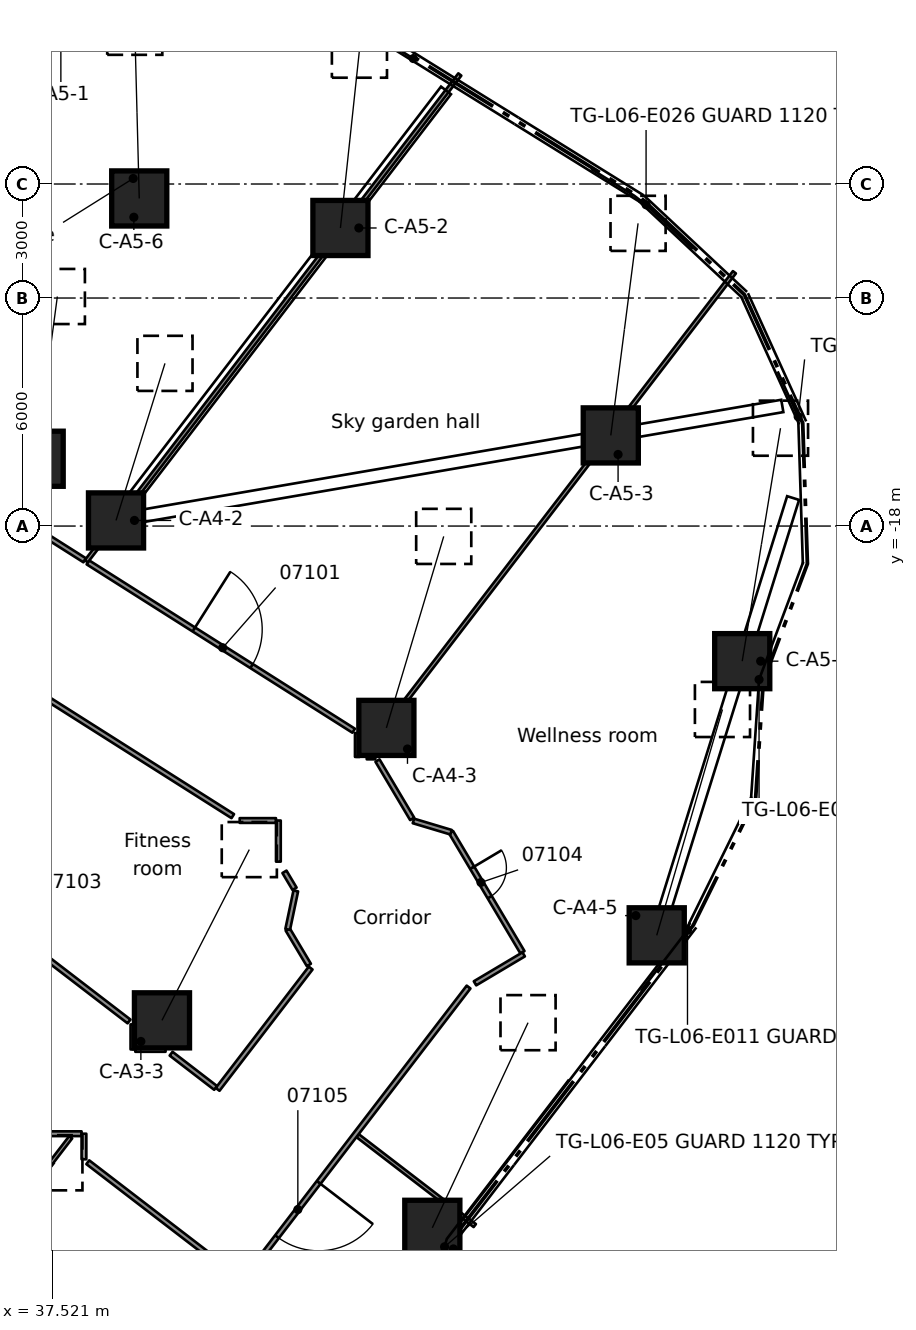
"""IFC4 building model, lengths in metres.
Left out: names, types, materials, properties, quantities, classifications, styles, units other than length and angle.
Written with IfcOpenShell. Run it as: python <this file> out.ifc"""

import sys

from ifc_helpers import new_model, si_unit, direction, frame, frame_2d, origin, origin_2d, place, context, subcontext, project, spatial, rectangle, extrude, element, fill, save


model = new_model("IFC4")
c1 = context("Model", 3, precision=1e-05, world=origin(), true_north=direction((0.0, 1.0)))
c2 = subcontext(c1, "Body", "Model", "MODEL_VIEW")
j1 = project(units=[si_unit("LENGTHUNIT", "METRE"), si_unit("PLANEANGLEUNIT", "RADIAN")], contexts=[c1])
p1 = place(None, origin())
s1 = spatial("IfcSite", under=j1, at=p1, CompositionType="ELEMENT")
p2 = place(p1, origin())
s2 = spatial("IfcBuilding", under=s1, at=p2, CompositionType="ELEMENT")
p3 = place(p2, frame((0.0, 0.0, 33.3)))
s3 = spatial("IfcBuildingStorey", under=s2, at=p3, CompositionType="ELEMENT", Elevation=33.3)
p4 = place(p3, frame((34.503, -38.702, 0.637), z_axis=(0.541117976568, 0.69200623164, 0.477827072073), x_axis=(-0.78775473141, 0.615989028426, 0.0)))
e1 = element("IfcColumn", 1, at=p4, inside=s3, PredefinedType="COLUMN", context=c2, shape_type="SweptSolid", body=[
    extrude(rectangle(XDim=1.45, YDim=1.45, at=origin_2d()), origin(), (0.0, 0.0, 1.0), 5.705),
])
p5 = place(p3, frame((40.408, -31.006, 0.638), z_axis=(0.400711857271, 0.78345915449, 0.474996590187), x_axis=(-0.890307002668, 0.455360781141, 0.0)))
e2 = element("IfcColumn", 2, at=p5, inside=s3, PredefinedType="COLUMN", context=c2, shape_type="SweptSolid", body=[
    extrude(rectangle(XDim=1.45, YDim=1.45, at=origin_2d()), origin(), (0.0, 0.0, 1.0), 5.735),
])
p6 = place(p3, frame((47.522, -36.465, 0.661), z_axis=(0.385700751852, 0.82653899246, 0.409961246905), x_axis=(-0.90619046906, 0.422869759837, 0.0)))
e3 = element("IfcColumn", 3, at=p6, inside=s3, PredefinedType="COLUMN", context=c2, shape_type="SweptSolid", body=[
    extrude(rectangle(XDim=1.45, YDim=1.45, at=origin_2d()), origin(), (0.0, 0.0, 1.0), 6.531),
])
p7 = place(p3, frame((39.199, -17.852, 0.61), z_axis=(0.25036864759, 0.80335307715, 0.540314143566), x_axis=(-0.954709488998, 0.297539563114, 0.0)))
e4 = element("IfcColumn", 4, at=p7, inside=s3, PredefinedType="COLUMN", context=c2, shape_type="SweptSolid", body=[
    extrude(rectangle(XDim=1.45, YDim=1.45, at=origin_2d()), origin(), (0.0, 0.0, 1.0), 5.145),
])
p8 = place(p3, frame((46.313, -23.311, 0.644), z_axis=(0.255000909498, 0.851515737267, 0.458143520463), x_axis=(-0.957966687466, 0.286879461978, 0.0)))
e5 = element("IfcColumn", 5, at=p8, inside=s3, PredefinedType="COLUMN", context=c2, shape_type="SweptSolid", body=[
    extrude(rectangle(XDim=1.45, YDim=1.45, at=origin_2d()), origin(), (0.0, 0.0, 1.0), 5.918),
])
p9 = place(p3, frame((53.427, -28.769, 0.666), z_axis=(0.256655259317, 0.881704625679, 0.39588512339), x_axis=(-0.960148736075, 0.279489542942, 0.0)))
e6 = element("IfcColumn", 6, at=p9, inside=s3, PredefinedType="COLUMN", context=c2, shape_type="SweptSolid", body=[
    extrude(rectangle(XDim=1.45, YDim=1.45, at=origin_2d()), origin(), (0.0, 0.0, 1.0), 6.74),
])
p10 = place(p3, frame((37.084, -16.229, 0.609), z_axis=(0.111371211993, 0.832593849041, 0.54257159498), x_axis=(-0.991171870731, 0.132583266936, 0.0)))
e7 = element("IfcColumn", 7, at=p10, inside=s3, PredefinedType="COLUMN", context=c2, shape_type="SweptSolid", body=[
    extrude(rectangle(XDim=1.45, YDim=1.45, at=origin_2d()), origin(), (0.0, 0.0, 1.0), 5.127),
])
p11 = place(p3, frame((45.104, -10.157, 0.626), z_axis=(0.091757731711, 0.858660609492, 0.50426429219), x_axis=(-0.994338753554, 0.106256497119, 0.0)))
e8 = element("IfcColumn", 8, at=p11, inside=s3, PredefinedType="COLUMN", context=c2, shape_type="SweptSolid", body=[
    extrude(rectangle(XDim=1.45, YDim=1.45, at=origin_2d()), origin(), (0.0, 0.0, 1.0), 5.449),
])
p12 = place(p3, frame((52.218, -15.615, 0.654), z_axis=(0.115123823075, 0.894685515202, 0.431606689299), x_axis=(-0.99182275443, 0.127622975183, 0.0)))
e9 = element("IfcColumn", 9, at=p12, inside=s3, PredefinedType="COLUMN", context=c2, shape_type="SweptSolid", body=[
    extrude(rectangle(XDim=1.45, YDim=1.45, at=origin_2d()), origin(), (0.0, 0.0, 1.0), 6.237),
])
p13 = place(p3, frame((55.677, -21.555, 0.666), z_axis=(0.148964077478, 0.906712741166, 0.394565214672), x_axis=(-0.986771549623, 0.162116960419, 0.0)))
e10 = element("IfcColumn", 10, at=p13, inside=s3, PredefinedType="COLUMN", context=c2, shape_type="SweptSolid", body=[
    extrude(rectangle(XDim=1.45, YDim=1.45, at=origin_2d()), origin(), (0.0, 0.0, 1.0), 6.76),
])
p14 = place(p3, frame((39.81, -9.38, 0.618), z_axis=(-0.022355527015, 0.852096616474, 0.522906862267), x_axis=(-0.999656016178, -0.026226881604, 0.0)))
e11 = element("IfcColumn", 11, at=p14, inside=s3, PredefinedType="COLUMN", context=c2, shape_type="SweptSolid", body=[
    extrude(rectangle(XDim=1.45, YDim=1.45, at=origin_2d()), origin(), (0.0, 0.0, 1.0), 5.286),
])
p15 = place(p3, frame((43.631, -27.098, 0.0), z_axis=(0.0, 0.0, 1.0), x_axis=(0.511178490391, -0.859474578426, 0.0)))
e12 = element("IfcWall", 12, at=p15, inside=s3, PredefinedType="PARTITIONING", context=c2, shape_type="SweptSolid", body=[
    extrude(rectangle(XDim=0.52, YDim=0.125, at=frame_2d((0.26, 0.0))), origin(), (0.0, 0.0, 1.0), 3.56),
])
p16 = place(p3, frame((46.079, -24.17, 0.0), z_axis=(0.0, 0.0, 1.0), x_axis=(0.511094498765, -0.859524527476, 0.0)))
e13 = element("IfcWall", 13, at=p16, inside=s3, PredefinedType="PARTITIONING", context=c2, shape_type="SweptSolid", body=[
    extrude(rectangle(XDim=1.786, YDim=0.125, at=frame_2d((0.893, 0.0))), origin(), (0.0, 0.0, 1.0), 3.56),
])
p17 = place(p3, frame((48.015, -26.056, 0.0), z_axis=(0.0, 0.0, 1.0), x_axis=(0.511219942642, -0.859449923059, 0.0)))
e14 = element("IfcWall", 14, at=p17, inside=s3, PredefinedType="PARTITIONING", context=c2, shape_type="SweptSolid", body=[
    extrude(rectangle(XDim=3.676, YDim=0.125, at=frame_2d((1.838, 0.0))), origin(), (0.0, 0.0, 1.0), 3.56),
])
p18 = place(p17, frame((1.088, 0.0, 0.0)))
e15 = element("IfcOpeningElement", 15, at=p18, cuts=e14, PredefinedType="OPENING", context=c2, shape_type="SweptSolid", body=[
    extrude(rectangle(XDim=0.9, YDim=2.1, at=frame_2d((0.45, 1.05))), frame((0.0, 0.073, 0.0), z_axis=(0.0, -1.0, 0.0), x_axis=(1.0, 0.0, 0.0)), (0.0, 0.0, 1.0), 0.145),
])
p19 = place(p3, frame((43.716, -28.613, 0.0), z_axis=(0.0, 0.0, 1.0), x_axis=(0.511956455833, -0.859011401165, 0.0)))
e16 = element("IfcWall", 16, at=p19, inside=s3, PredefinedType="PARTITIONING", context=c2, shape_type="SweptSolid", body=[
    extrude(rectangle(XDim=1.09, YDim=0.125, at=frame_2d((0.545, 0.0))), origin(), (0.0, 0.0, 1.0), 3.56),
])
p20 = place(p3, frame((38.456, -34.739, 0.0), z_axis=(0.0, 0.0, 1.0), x_axis=(0.79321861851, -0.608936961638, 0.0)))
e17 = element("IfcWall", 17, at=p20, inside=s3, PredefinedType="PARTITIONING", context=c2, shape_type="SweptSolid", body=[
    extrude(rectangle(XDim=5.079, YDim=0.125, at=frame_2d((2.54, 0.0))), origin(), (0.0, 0.0, 1.0), 3.56),
])
p21 = place(p3, frame((33.534, -26.426, 0.0), z_axis=(0.0, 0.0, 1.0), x_axis=(0.793385739593, -0.60871920309, 0.0)))
e18 = element("IfcWall", 18, at=p21, inside=s3, PredefinedType="PARTITIONING", context=c2, shape_type="SweptSolid", body=[
    extrude(rectangle(XDim=7.572, YDim=0.125, at=frame_2d((3.786, 0.0))), origin(), (0.0, 0.0, 1.0), 3.56),
])
p22 = place(p21, frame((3.166, 0.0, 0.0)))
e19 = element("IfcOpeningElement", 19, at=p22, cuts=e18, PredefinedType="OPENING", context=c2, shape_type="SweptSolid", body=[
    extrude(rectangle(XDim=1.1, YDim=2.1, at=frame_2d((0.55, 1.05))), frame((0.0, 0.073, 0.0), z_axis=(0.0, -1.0, 0.0), x_axis=(1.0, 0.0, 0.0)), (0.0, 0.0, 1.0), 0.145),
])
p23 = place(p3, frame((40.648, -31.883, 0.0), z_axis=(0.0, 0.0, 1.0), x_axis=(0.792869496174, -0.609391468628, 0.0)))
e20 = element("IfcWall", 20, at=p23, inside=s3, PredefinedType="PARTITIONING", context=c2, shape_type="SweptSolid", body=[
    extrude(rectangle(XDim=1.478, YDim=0.125, at=frame_2d((0.739, 0.0))), origin(), (0.0, 0.0, 1.0), 3.56),
])
p24 = place(p3, frame((45.555, -34.039, 0.0), z_axis=(0.0, 0.0, 1.0), x_axis=(0.793288869705, -0.608845439502, 0.0)))
e21 = element("IfcWall", 21, at=p24, inside=s3, PredefinedType="PARTITIONING", context=c2, shape_type="SweptSolid", body=[
    extrude(rectangle(XDim=3.888, YDim=0.1, at=frame_2d((1.944, 0.0))), origin(), (0.0, 0.0, 1.0), 3.56),
])
p25 = place(p3, frame((36.312, -21.857, 0.0), z_axis=(0.0, 0.0, 1.0), x_axis=(0.844684518411, -0.535264480755, 0.0)))
e22 = element("IfcWall", 22, at=p25, inside=s3, PredefinedType="PARTITIONING", context=c2, shape_type="SweptSolid", body=[
    extrude(rectangle(XDim=7.055, YDim=0.125, at=frame_2d((3.527, 0.0))), origin(), (0.0, 0.0, 1.0), 3.56),
])
p26 = place(p3, frame((38.458, -18.955, 0.0), z_axis=(0.0, 0.0, 1.0), x_axis=(0.84479374754, -0.535092070692, 0.0)))
e23 = element("IfcWall", 23, at=p26, inside=s3, PredefinedType="PARTITIONING", context=c2, shape_type="SweptSolid", body=[
    extrude(rectangle(XDim=8.279, YDim=0.125, at=frame_2d((4.139, 0.0))), origin(), (0.0, 0.0, 1.0), 3.56),
])
p27 = place(p26, frame((3.3, 0.0, 0.0)))
e24 = element("IfcOpeningElement", 24, at=p27, cuts=e23, PredefinedType="OPENING", context=c2, shape_type="SweptSolid", body=[
    extrude(rectangle(XDim=1.8, YDim=2.1, at=frame_2d((0.9, 1.05))), frame((0.0, 0.073, 0.0), z_axis=(0.0, -1.0, 0.0), x_axis=(1.0, 0.0, 0.0)), (0.0, 0.0, 1.0), 0.145),
])
p28 = place(p3, frame((29.716, -13.418, 0.0), z_axis=(0.0, 0.0, 1.0), x_axis=(0.844839535243, -0.535019775047, 0.0)))
e25 = element("IfcWall", 25, at=p28, inside=s3, PredefinedType="PARTITIONING", context=c2, shape_type="SweptSolid", body=[
    extrude(rectangle(XDim=10.248, YDim=0.125, at=frame_2d((5.124, 0.0))), origin(), (0.0, 0.0, 1.0), 3.56),
])
p29 = place(p28, frame((4.3, 0.0, 0.0)))
e26 = element("IfcOpeningElement", 26, at=p29, cuts=e25, PredefinedType="OPENING", context=c2, shape_type="SweptSolid", body=[
    extrude(rectangle(XDim=1.8, YDim=2.1, at=frame_2d((0.9, 1.05))), frame((0.0, 0.073, 0.0), z_axis=(0.0, -1.0, 0.0), x_axis=(1.0, 0.0, 0.0)), (0.0, 0.0, 1.0), 0.145),
])
p30 = place(p3, frame((37.478, -33.989, 0.0), z_axis=(0.0, 0.0, 1.0), x_axis=(1.0, 0.0, 0.0)))
e27 = element("IfcWall", 27, at=p30, inside=s3, PredefinedType="PARTITIONING", context=c2, shape_type="SweptSolid", body=[
    extrude(rectangle(XDim=0.814, YDim=0.125, at=frame_2d((0.407, 0.0))), origin(), (0.0, 0.0, 1.0), 3.56),
])
p31 = place(p3, frame((39.706, -31.771, 0.0), z_axis=(0.0, 0.0, 1.0), x_axis=(1.0, 0.0, 0.0)))
e28 = element("IfcWall", 28, at=p31, inside=s3, PredefinedType="PARTITIONING", context=c2, shape_type="SweptSolid", body=[
    extrude(rectangle(XDim=0.796, YDim=0.125, at=frame_2d((0.398, 0.0))), origin(), (0.0, 0.0, 1.0), 3.56),
])
p32 = place(p3, frame((42.453, -25.748, 0.0), z_axis=(0.0, 0.0, 1.0), x_axis=(1.0, 0.0, 0.0)))
e29 = element("IfcWall", 29, at=p32, inside=s3, PredefinedType="PARTITIONING", context=c2, shape_type="SweptSolid", body=[
    extrude(rectangle(XDim=0.955, YDim=0.125, at=frame_2d((0.478, 0.0))), origin(), (0.0, 0.0, 1.0), 3.56),
])
p33 = place(p3, frame((45.796, -24.075, 0.0), z_axis=(0.0, 0.0, 1.0), x_axis=(1.0, 0.0, 0.0)))
e30 = element("IfcWall", 30, at=p33, inside=s3, PredefinedType="PARTITIONING", context=c2, shape_type="SweptSolid", body=[
    extrude(rectangle(XDim=0.226, YDim=0.125, at=frame_2d((0.113, 0.0))), origin(), (0.0, 0.0, 1.0), 3.56),
])
p34 = place(p3, frame((48.645, -30.032, 0.0), z_axis=(0.0, 0.0, 1.0), x_axis=(0.859452253387, 0.511216024933, 0.0)))
e31 = element("IfcWall", 31, at=p34, inside=s3, PredefinedType="PARTITIONING", context=c2, shape_type="SweptSolid", body=[
    extrude(rectangle(XDim=1.49, YDim=0.125, at=frame_2d((0.745, 0.0))), origin(), (0.0, 0.0, 1.0), 3.56),
])
p35 = place(p3, frame((47.024, -25.759, 0.0), z_axis=(0.0, 0.0, 1.0), x_axis=(0.957936637973, -0.286979786099, 0.0)))
e32 = element("IfcWall", 32, at=p35, inside=s3, PredefinedType="PARTITIONING", context=c2, shape_type="SweptSolid", body=[
    extrude(rectangle(XDim=1.034, YDim=0.125, at=frame_2d((0.517, 0.0))), origin(), (0.0, 0.0, 1.0), 3.56),
])
p36 = place(p3, frame((43.716, -28.613, 0.0), z_axis=(0.0, 0.0, 1.0), x_axis=(0.205677625046, 0.978619800819, 0.0)))
e33 = element("IfcWall", 33, at=p36, inside=s3, PredefinedType="PARTITIONING", context=c2, shape_type="SweptSolid", body=[
    extrude(rectangle(XDim=1.035, YDim=0.125, at=frame_2d((0.518, 0.0))), origin(), (0.0, 0.0, 1.0), 3.56),
])
p37 = place(p3, frame((48.476, -30.13, 0.0), z_axis=(0.0, 0.0, 1.0), x_axis=(-0.608819151361, -0.793309045036, 0.0)))
e34 = element("IfcWall", 34, at=p37, inside=s3, PredefinedType="PARTITIONING", context=c2, shape_type="SweptSolid", body=[
    extrude(rectangle(XDim=9.757, YDim=0.125, at=frame_2d((4.878, 0.0))), origin(), (0.0, 0.0, 1.0), 3.56),
])
p38 = place(p37, frame((6.479, 0.0, 0.0)))
e35 = element("IfcOpeningElement", 35, at=p38, cuts=e34, PredefinedType="OPENING", context=c2, shape_type="SweptSolid", body=[
    extrude(rectangle(XDim=1.8, YDim=2.1, at=frame_2d((0.9, 1.05))), frame((0.0, 0.073, 0.0), z_axis=(0.0, -1.0, 0.0), x_axis=(1.0, 0.0, 0.0)), (0.0, 0.0, 1.0), 0.145),
])
p39 = place(p3, frame((41.872, -32.822, 0.0), z_axis=(0.0, 0.0, 1.0), x_axis=(0.60869266474, 0.793406100236, 0.0)))
e36 = element("IfcWall", 36, at=p39, inside=s3, PredefinedType="PARTITIONING", context=c2, shape_type="SweptSolid", body=[
    extrude(rectangle(XDim=4.023, YDim=0.125, at=frame_2d((2.012, 0.0))), origin(), (0.0, 0.0, 1.0), 3.56),
])
p40 = place(p3, frame((28.054, -47.051, 0.0), z_axis=(0.0, 0.0, 1.0), x_axis=(0.608787965218, 0.793332977636, 0.0)))
e37 = element("IfcWall", 37, at=p40, inside=s3, PredefinedType="PARTITIONING", context=c2, shape_type="SweptSolid", body=[
    extrude(rectangle(XDim=16.347, YDim=0.1, at=frame_2d((8.174, 0.0))), origin(), (0.0, 0.0, 1.0), 3.56),
])
p41 = place(p3, frame((45.787, -23.942, 0.0), z_axis=(0.0, 0.0, 1.0), x_axis=(0.608772061456, 0.793345181614, 0.0)))
e38 = element("IfcWall", 38, at=p41, inside=s3, PredefinedType="PARTITIONING", context=c2, shape_type="SweptSolid", body=[
    extrude(rectangle(XDim=15.907, YDim=0.1, at=frame_2d((7.954, 0.0))), origin(), (0.0, 0.0, 1.0), 3.56),
])
p42 = place(p3, frame((38.416, -18.928, 0.0), z_axis=(0.0, 0.0, 1.0), x_axis=(0.608783820642, 0.793336158084, 0.0)))
e39 = element("IfcWall", 39, at=p42, inside=s3, PredefinedType="PARTITIONING", context=c2, shape_type="SweptSolid", body=[
    extrude(rectangle(XDim=16.147, YDim=0.1, at=frame_2d((8.073, 0.0))), origin(), (0.0, 0.0, 1.0), 3.56),
])
p43 = place(p3, frame((29.674, -13.391, 0.0), z_axis=(0.0, 0.0, 1.0), x_axis=(0.608731304684, 0.79337645459, 0.0)))
e40 = element("IfcWall", 40, at=p43, inside=s3, PredefinedType="PARTITIONING", context=c2, shape_type="SweptSolid", body=[
    extrude(rectangle(XDim=16.053, YDim=0.1, at=frame_2d((8.026, 0.0))), origin(), (0.0, 0.0, 1.0), 3.56),
])
p44 = place(p3, frame((45.549, -24.075, 0.0), z_axis=(0.0, 0.0, 1.0), x_axis=(0.0, 1.0, 0.0)))
e41 = element("IfcWall", 41, at=p44, inside=s3, PredefinedType="PARTITIONING", context=c2, shape_type="SweptSolid", body=[
    extrude(rectangle(XDim=0.629, YDim=0.125, at=frame_2d((0.314, 0.0))), origin(), (0.0, 0.0, 1.0), 3.56),
])
p45 = place(p3, frame((43.471, -26.83, 0.0), z_axis=(0.0, 0.0, 1.0), x_axis=(0.0, 1.0, 0.0)))
e42 = element("IfcWall", 42, at=p45, inside=s3, PredefinedType="PARTITIONING", context=c2, shape_type="SweptSolid", body=[
    extrude(rectangle(XDim=1.082, YDim=0.125, at=frame_2d((0.541, 0.0))), origin(), (0.0, 0.0, 1.0), 3.56),
])
p46 = place(p3, frame((39.644, -31.771, 0.0), z_axis=(0.0, 0.0, 1.0), x_axis=(0.0, 1.0, 0.0)))
e43 = element("IfcWall", 43, at=p46, inside=s3, PredefinedType="PARTITIONING", context=c2, shape_type="SweptSolid", body=[
    extrude(rectangle(XDim=0.659, YDim=0.125, at=frame_2d((0.33, 0.0))), origin(), (0.0, 0.0, 1.0), 3.56),
])
p47 = place(p3, frame((38.355, -34.662, 0.0), z_axis=(0.0, 0.0, 1.0), x_axis=(0.0, 1.0, 0.0)))
e44 = element("IfcWall", 44, at=p47, inside=s3, PredefinedType="PARTITIONING", context=c2, shape_type="SweptSolid", body=[
    extrude(rectangle(XDim=0.673, YDim=0.125, at=frame_2d((0.336, 0.0))), origin(), (0.0, 0.0, 1.0), 3.56),
])
p48 = place(p27, origin())
e45 = element("IfcDoor", 45, at=p48, inside=s3, OperationType="DOUBLE_DOOR_SINGLE_SWING", PredefinedType="DOOR", context=c2, shape_type="SweptSolid", body=[
    extrude(rectangle(XDim=1.8, YDim=2.1, at=frame_2d((0.9, 1.05))), frame((0.0, 0.025, 0.0), z_axis=(0.0, -1.0, 0.0), x_axis=(1.0, 0.0, 0.0)), (0.0, 0.0, 1.0), 0.05),
])
fill(e24, e45)
p49 = place(p18, origin())
e46 = element("IfcDoor", 46, at=p49, inside=s3, OperationType="SINGLE_SWING_LEFT", PredefinedType="DOOR", context=c2, shape_type="SweptSolid", body=[
    extrude(rectangle(XDim=0.9, YDim=2.1, at=frame_2d((0.45, 1.05))), frame((0.0, 0.025, 0.0), z_axis=(0.0, -1.0, 0.0), x_axis=(1.0, 0.0, 0.0)), (0.0, 0.0, 1.0), 0.05),
])
fill(e15, e46)
p50 = place(p38, origin())
e47 = element("IfcDoor", 47, at=p50, inside=s3, OperationType="DOUBLE_DOOR_SINGLE_SWING", PredefinedType="DOOR", context=c2, shape_type="SweptSolid", body=[
    extrude(rectangle(XDim=1.8, YDim=2.1, at=frame_2d((0.9, 1.05))), frame((0.0, 0.025, 0.0), z_axis=(0.0, -1.0, 0.0), x_axis=(1.0, 0.0, 0.0)), (0.0, 0.0, 1.0), 0.05),
])
fill(e35, e47)
save(model, sys.argv[1])
